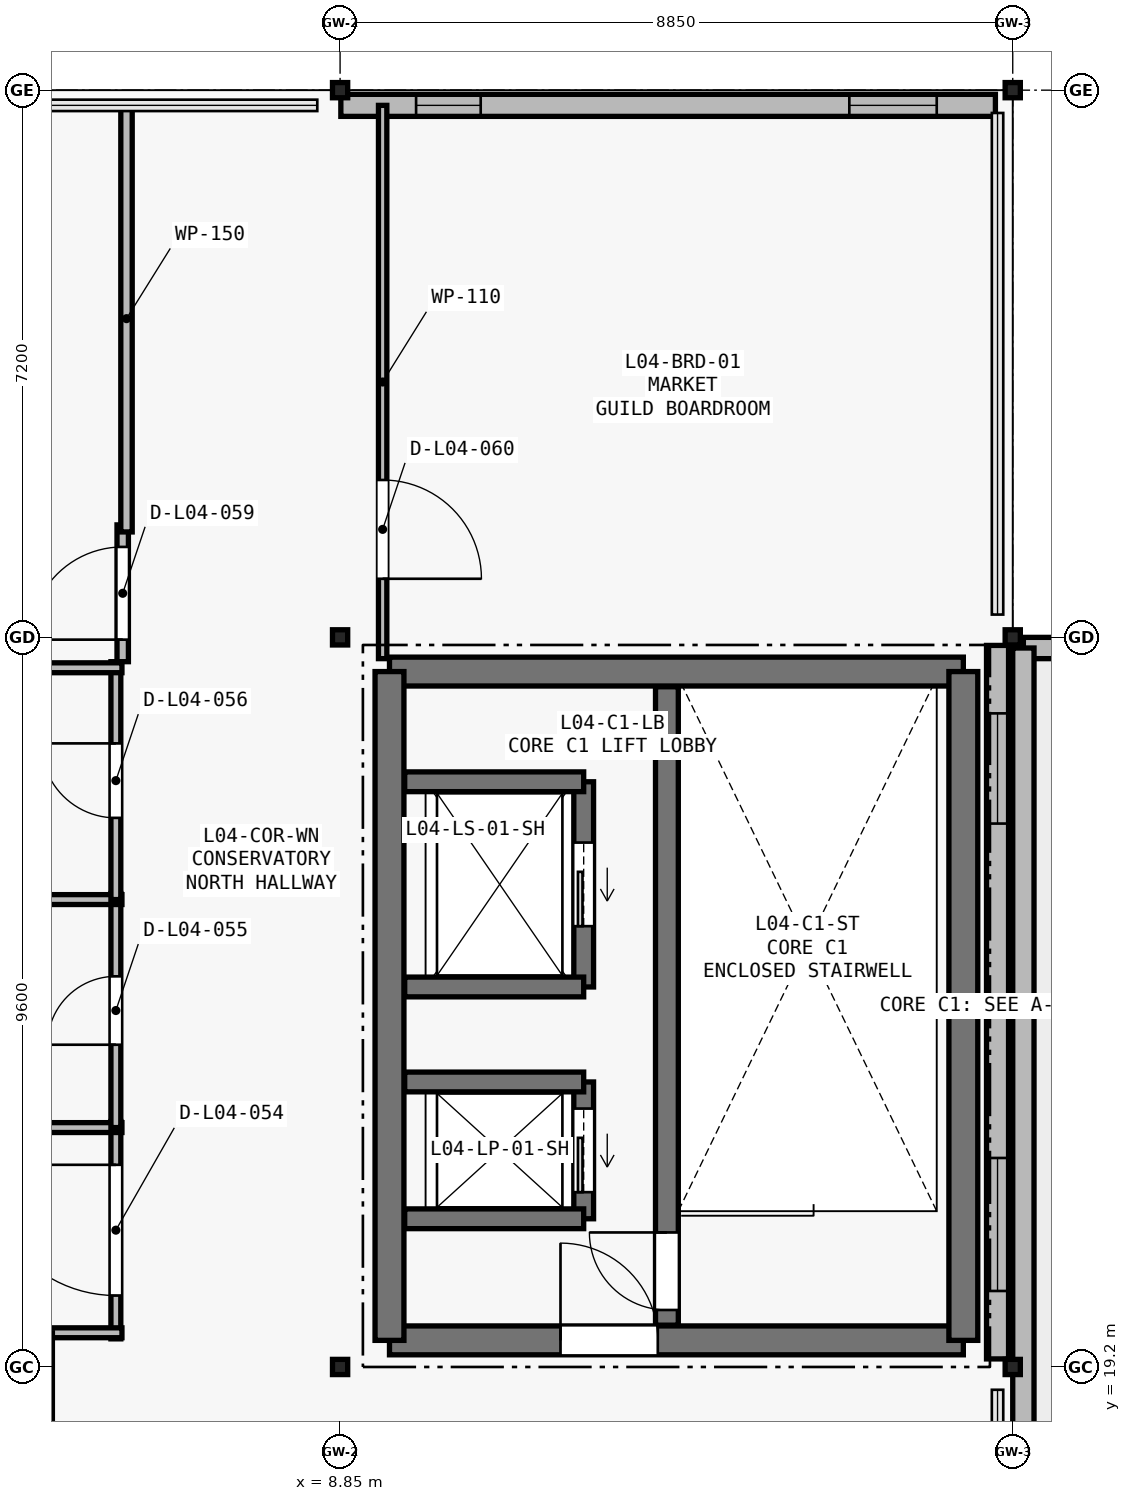
"""IFC4 building model, lengths in metres.
Left out: names, types, materials, properties, quantities, classifications, styles, units other than length and angle.
Written with IfcOpenShell. Run it as: python <this file> out.ifc"""

import sys

from ifc_helpers import new_model, si_unit, direction, frame, frame_2d, origin, origin_2d, place, context, subcontext, project, spatial, rectangle, i_section, extrude, element, fill, save


model = new_model("IFC4")
c1 = context("Model", 3, precision=1e-05, world=origin(), true_north=direction((0.0, 1.0)))
c2 = subcontext(c1, "Body", "Model", "MODEL_VIEW")
j1 = project(units=[si_unit("LENGTHUNIT", "METRE"), si_unit("PLANEANGLEUNIT", "RADIAN")], contexts=[c1])
p1 = place(None, origin())
s1 = spatial("IfcSite", under=j1, at=p1, CompositionType="ELEMENT")
p2 = place(p1, origin())
s2 = spatial("IfcBuilding", under=s1, at=p2, CompositionType="ELEMENT")
p3 = place(p2, frame((0.0, 0.0, 19.2)))
s3 = spatial("IfcBuildingStorey", under=s2, at=p3, CompositionType="ELEMENT", Elevation=19.2)
for number, where, z_axis, x_axis in (
    (1, (8.85, 19.2, 0.0), (0.0, 0.0, 1.0), (1.0, 0.0, 0.0)),
    (2, (8.85, 28.8, 0.0), (0.0, 0.0, 1.0), (1.0, 0.0, 0.0)),
    (3, (8.85, 36.0, 0.0), (0.0, 0.0, 1.0), (1.0, 0.0, 0.0)),
    (4, (17.7, 19.2, 0.0), (0.0, 0.0, 1.0), (1.0, 0.0, 0.0)),
    (5, (17.7, 28.8, 0.0), (0.0, 0.0, 1.0), (1.0, 0.0, 0.0)),
    (6, (17.7, 36.0, 0.0), (0.0, 0.0, 1.0), (1.0, 0.0, 0.0)),
):
    element("IfcColumn", number, at=place(p3, frame(where, z_axis=z_axis, x_axis=x_axis)), inside=s3, PredefinedType="COLUMN", context=c2, shape_type="SweptSolid", body=[
        extrude(i_section(OverallWidth=0.2, OverallDepth=0.2, WebThickness=0.008, FlangeThickness=0.012, FilletRadius=0.013, at=origin_2d()), origin(), (0.0, 0.0, 1.0), 4.2),
    ])
p4 = place(p3, frame((8.86, 35.8, 0.0), z_axis=(0.0, 0.0, 1.0), x_axis=(1.0, 0.0, 0.0)))
e7 = element("IfcWall", 7, at=p4, inside=s3, PredefinedType="SOLIDWALL", context=c2, shape_type="SweptSolid", body=[
    extrude(rectangle(XDim=8.612, YDim=0.29, at=frame_2d((4.306, 0.0))), origin(), (0.0, 0.0, 1.0), 3.35),
])
p5 = place(p4, frame((0.99, 0.0, 0.95)))
e8 = element("IfcOpeningElement", 8, at=p5, cuts=e7, PredefinedType="OPENING", context=c2, shape_type="SweptSolid", body=[
    extrude(rectangle(XDim=0.85, YDim=1.5, at=frame_2d((0.425, 0.75))), frame((0.0, 0.155, 0.0), z_axis=(0.0, -1.0, 0.0), x_axis=(1.0, 0.0, 0.0)), (0.0, 0.0, 1.0), 0.31),
])
p6 = place(p4, frame((6.69, 0.0, 0.95)))
e9 = element("IfcOpeningElement", 9, at=p6, cuts=e7, PredefinedType="OPENING", context=c2, shape_type="SweptSolid", body=[
    extrude(rectangle(XDim=1.15, YDim=1.5, at=frame_2d((0.575, 0.75))), frame((0.0, 0.155, 0.0), z_axis=(0.0, -1.0, 0.0), x_axis=(1.0, 0.0, 0.0)), (0.0, 0.0, 1.0), 0.31),
])
p7 = place(p3, frame((17.5, 28.694, 0.0), z_axis=(0.0, 0.0, 1.0), x_axis=(0.0, -1.0, 0.0)))
e10 = element("IfcWall", 10, at=p7, inside=s3, PredefinedType="SOLIDWALL", context=c2, shape_type="SweptSolid", body=[
    extrude(rectangle(XDim=9.388, YDim=0.29, at=frame_2d((4.694, 0.0))), origin(), (0.0, 0.0, 1.0), 3.35),
])
p8 = place(p7, frame((0.894, 0.0, 0.95)))
e11 = element("IfcOpeningElement", 11, at=p8, cuts=e10, PredefinedType="OPENING", context=c2, shape_type="SweptSolid", body=[
    extrude(rectangle(XDim=1.45, YDim=1.5, at=frame_2d((0.725, 0.75))), frame((0.0, 0.155, 0.0), z_axis=(0.0, -1.0, 0.0), x_axis=(1.0, 0.0, 0.0)), (0.0, 0.0, 1.0), 0.31),
])
p9 = place(p7, frame((6.744, 0.0, 0.95)))
e12 = element("IfcOpeningElement", 12, at=p9, cuts=e10, PredefinedType="OPENING", context=c2, shape_type="SweptSolid", body=[
    extrude(rectangle(XDim=1.75, YDim=1.5, at=frame_2d((0.875, 0.75))), frame((0.0, 0.155, 0.0), z_axis=(0.0, -1.0, 0.0), x_axis=(1.0, 0.0, 0.0)), (0.0, 0.0, 1.0), 0.31),
])
p10 = place(p3, frame((26.41, 28.66, 0.01), z_axis=(0.0, 0.0, 1.0), x_axis=(-1.0, 0.0, 0.0)))
e13 = element("IfcWall", 13, at=p10, inside=s3, PredefinedType="PARAPET", context=c2, shape_type="SweptSolid", body=[
    extrude(rectangle(XDim=8.57, YDim=0.28, at=frame_2d((4.285, 0.0))), origin(), (0.0, 0.0, 1.0), 1.15),
])
p11 = place(p3, frame((17.84, 28.66, 0.01), z_axis=(0.0, 0.0, 1.0), x_axis=(0.0, -1.0, 0.0)))
e14 = element("IfcWall", 14, at=p11, inside=s3, PredefinedType="PARAPET", context=c2, shape_type="SweptSolid", body=[
    extrude(rectangle(XDim=28.52, YDim=0.28, at=frame_2d((14.26, 0.0))), origin(), (0.0, 0.0, 1.0), 1.15),
])
p12 = place(p3, frame((9.5, 19.55, 0.0), z_axis=(0.0, 0.0, 1.0), x_axis=(1.0, 0.0, 0.0)))
e15 = element("IfcWall", 15, at=p12, inside=s3, PredefinedType="SHEAR", context=c2, shape_type="SweptSolid", body=[
    extrude(rectangle(XDim=7.55, YDim=0.38, at=frame_2d((3.775, 0.0))), origin(), (0.0, 0.0, 1.0), 4.2),
])
p13 = place(p12, frame((2.25, 0.0, 0.0)))
e16 = element("IfcOpeningElement", 16, at=p13, cuts=e15, PredefinedType="OPENING", context=c2, shape_type="SweptSolid", body=[
    extrude(rectangle(XDim=1.28, YDim=2.15, at=frame_2d((0.64, 1.075))), frame((0.0, 0.2, 0.0), z_axis=(0.0, -1.0, 0.0), x_axis=(1.0, 0.0, 0.0)), (0.0, 0.0, 1.0), 0.4),
])
p14 = place(p3, frame((17.05, 28.35, 0.0), z_axis=(0.0, 0.0, 1.0), x_axis=(-1.0, 0.0, 0.0)))
e17 = element("IfcWall", 17, at=p14, inside=s3, PredefinedType="SHEAR", context=c2, shape_type="SweptSolid", body=[
    extrude(rectangle(XDim=7.55, YDim=0.38, at=frame_2d((3.775, 0.0))), origin(), (0.0, 0.0, 1.0), 4.2),
])
for number, where, z_axis, x_axis in (
    (18, (9.5, 28.35, 0.0), (0.0, 0.0, 1.0), (0.0, -1.0, 0.0)),
    (19, (17.05, 19.55, 0.0), (0.0, 0.0, 1.0), (0.0, 1.0, 0.0)),
):
    element("IfcWall", number, at=place(p3, frame(where, z_axis=z_axis, x_axis=x_axis)), inside=s3, PredefinedType="SHEAR", context=c2, shape_type="SweptSolid", body=[
        extrude(rectangle(XDim=8.8, YDim=0.38, at=frame_2d((4.4, 0.0))), origin(), (0.0, 0.0, 1.0), 4.2),
    ])
p15 = place(p3, frame((13.15, 19.75, 0.0), z_axis=(0.0, 0.0, 1.0), x_axis=(0.0, 1.0, 0.0)))
e20 = element("IfcWall", 20, at=p15, inside=s3, PredefinedType="SHEAR", context=c2, shape_type="SweptSolid", body=[
    extrude(rectangle(XDim=8.4, YDim=0.3, at=frame_2d((4.2, 0.0))), origin(), (0.0, 0.0, 1.0), 4.2),
])
p16 = place(p15, frame((0.2, 0.0, 0.0)))
e21 = element("IfcOpeningElement", 21, at=p16, cuts=e20, PredefinedType="OPENING", context=c2, shape_type="SweptSolid", body=[
    extrude(rectangle(XDim=1.02, YDim=2.1, at=frame_2d((0.51, 1.05))), frame((0.0, 0.16, 0.0), z_axis=(0.0, -1.0, 0.0), x_axis=(1.0, 0.0, 0.0)), (0.0, 0.0, 1.0), 0.32),
])
p17 = place(p3, frame((12.055, 21.15, 0.0), z_axis=(0.0, 0.0, 1.0), x_axis=(0.0, 1.0, 0.0)))
e22 = element("IfcWall", 22, at=p17, inside=s3, PredefinedType="SHEAR", context=c2, shape_type="SweptSolid", body=[
    extrude(rectangle(XDim=1.8, YDim=0.26, at=frame_2d((0.9, 0.0))), origin(), (0.0, 0.0, 1.0), 4.2),
])
p18 = place(p17, frame((0.35, 0.0, 0.0)))
e23 = element("IfcOpeningElement", 23, at=p18, cuts=e22, PredefinedType="OPENING", context=c2, shape_type="SweptSolid", body=[
    extrude(rectangle(XDim=1.1, YDim=2.15, at=frame_2d((0.55, 1.075))), frame((0.0, 0.14, 0.0), z_axis=(0.0, -1.0, 0.0), x_axis=(1.0, 0.0, 0.0)), (0.0, 0.0, 1.0), 0.28),
])
for number, where, z_axis, x_axis in (
    (24, (9.7, 21.15, 0.0), (0.0, 0.0, 1.0), (1.0, 0.0, 0.0)),
    (25, (9.7, 22.95, 0.0), (0.0, 0.0, 1.0), (1.0, 0.0, 0.0)),
):
    element("IfcWall", number, at=place(p3, frame(where, z_axis=z_axis, x_axis=x_axis)), inside=s3, PredefinedType="SHEAR", context=c2, shape_type="SweptSolid", body=[
        extrude(rectangle(XDim=2.355, YDim=0.26, at=frame_2d((1.177, 0.0))), origin(), (0.0, 0.0, 1.0), 4.2),
    ])
p19 = place(p3, frame((12.055, 24.2, 0.0), z_axis=(0.0, 0.0, 1.0), x_axis=(0.0, 1.0, 0.0)))
e26 = element("IfcWall", 26, at=p19, inside=s3, PredefinedType="SHEAR", context=c2, shape_type="SweptSolid", body=[
    extrude(rectangle(XDim=2.7, YDim=0.26, at=frame_2d((1.35, 0.0))), origin(), (0.0, 0.0, 1.0), 4.2),
])
p20 = place(p19, frame((0.8, 0.0, 0.0)))
e27 = element("IfcOpeningElement", 27, at=p20, cuts=e26, PredefinedType="OPENING", context=c2, shape_type="SweptSolid", body=[
    extrude(rectangle(XDim=1.1, YDim=2.15, at=frame_2d((0.55, 1.075))), frame((0.0, 0.14, 0.0), z_axis=(0.0, -1.0, 0.0), x_axis=(1.0, 0.0, 0.0)), (0.0, 0.0, 1.0), 0.28),
])
for number, where, z_axis, x_axis in (
    (28, (9.7, 24.2, 0.0), (0.0, 0.0, 1.0), (1.0, 0.0, 0.0)),
    (29, (9.7, 26.9, 0.0), (0.0, 0.0, 1.0), (1.0, 0.0, 0.0)),
):
    element("IfcWall", number, at=place(p3, frame(where, z_axis=z_axis, x_axis=x_axis)), inside=s3, PredefinedType="SHEAR", context=c2, shape_type="SweptSolid", body=[
        extrude(rectangle(XDim=2.355, YDim=0.26, at=frame_2d((1.177, 0.0))), origin(), (0.0, 0.0, 1.0), 4.2),
    ])
p21 = place(p3, frame((5.9, 19.57, 0.0), z_axis=(0.0, 0.0, 1.0), x_axis=(0.0, 1.0, 0.0)))
e30 = element("IfcWall", 30, at=p21, inside=s3, PredefinedType="PARTITIONING", context=c2, shape_type="SweptSolid", body=[
    extrude(rectangle(XDim=2.86, YDim=0.13, at=frame_2d((1.43, 0.0))), origin(), (0.0, 0.0, 1.0), 3.55),
])
p22 = place(p21, frame((0.57, 0.0, 0.0)))
e31 = element("IfcOpeningElement", 31, at=p22, cuts=e30, PredefinedType="OPENING", context=c2, shape_type="SweptSolid", body=[
    extrude(rectangle(XDim=1.72, YDim=2.32, at=frame_2d((0.86, 1.16))), frame((0.0, 0.075, 0.0), z_axis=(0.0, -1.0, 0.0), x_axis=(1.0, 0.0, 0.0)), (0.0, 0.0, 1.0), 0.15),
])
for number, where, z_axis, x_axis in (
    (32, (0.2, 19.65, 0.0), (0.0, 0.0, 1.0), (1.0, 0.0, 0.0)),
    (33, (5.98, 22.35, 0.0), (0.0, 0.0, 1.0), (-1.0, 0.0, 0.0)),
):
    element("IfcWall", number, at=place(p3, frame(where, z_axis=z_axis, x_axis=x_axis)), inside=s3, PredefinedType="PARTITIONING", context=c2, shape_type="SweptSolid", body=[
        extrude(rectangle(XDim=5.78, YDim=0.13, at=frame_2d((2.89, 0.0))), origin(), (0.0, 0.0, 1.0), 3.72),
    ])
p23 = place(p3, frame((5.9, 22.35, 0.0), z_axis=(0.0, 0.0, 1.0), x_axis=(0.0, 1.0, 0.0)))
e34 = element("IfcWall", 34, at=p23, inside=s3, PredefinedType="PARTITIONING", context=c2, shape_type="SweptSolid", body=[
    extrude(rectangle(XDim=3.08, YDim=0.13, at=frame_2d((1.54, 0.0))), origin(), (0.0, 0.0, 1.0), 3.55),
])
p24 = place(p23, frame((1.09, 0.0, 0.0)))
e35 = element("IfcOpeningElement", 35, at=p24, cuts=e34, PredefinedType="OPENING", context=c2, shape_type="SweptSolid", body=[
    extrude(rectangle(XDim=0.9, YDim=2.36, at=frame_2d((0.45, 1.18))), frame((0.0, 0.075, 0.0), z_axis=(0.0, -1.0, 0.0), x_axis=(1.0, 0.0, 0.0)), (0.0, 0.0, 1.0), 0.15),
])
p25 = place(p3, frame((5.98, 25.35, 0.0), z_axis=(0.0, 0.0, 1.0), x_axis=(-1.0, 0.0, 0.0)))
e36 = element("IfcWall", 36, at=p25, inside=s3, PredefinedType="PARTITIONING", context=c2, shape_type="SweptSolid", body=[
    extrude(rectangle(XDim=5.78, YDim=0.13, at=frame_2d((2.89, 0.0))), origin(), (0.0, 0.0, 1.0), 3.72),
])
p26 = place(p3, frame((5.9, 25.35, 0.0), z_axis=(0.0, 0.0, 1.0), x_axis=(0.0, 1.0, 0.0)))
e37 = element("IfcWall", 37, at=p26, inside=s3, PredefinedType="PARTITIONING", context=c2, shape_type="SweptSolid", body=[
    extrude(rectangle(XDim=3.13, YDim=0.13, at=frame_2d((1.565, 0.0))), origin(), (0.0, 0.0, 1.0), 3.55),
])
p27 = place(p26, frame((1.075, 0.0, 0.0)))
e38 = element("IfcOpeningElement", 38, at=p27, cuts=e37, PredefinedType="OPENING", context=c2, shape_type="SweptSolid", body=[
    extrude(rectangle(XDim=0.98, YDim=2.36, at=frame_2d((0.49, 1.18))), frame((0.0, 0.075, 0.0), z_axis=(0.0, -1.0, 0.0), x_axis=(1.0, 0.0, 0.0)), (0.0, 0.0, 1.0), 0.15),
])
p28 = place(p3, frame((5.98, 28.4, 0.0), z_axis=(0.0, 0.0, 1.0), x_axis=(-1.0, 0.0, 0.0)))
e39 = element("IfcWall", 39, at=p28, inside=s3, PredefinedType="PARTITIONING", context=c2, shape_type="SweptSolid", body=[
    extrude(rectangle(XDim=5.78, YDim=0.13, at=frame_2d((2.89, 0.0))), origin(), (0.0, 0.0, 1.0), 3.72),
])
p29 = place(p3, frame((4.98, 9.52, 0.0), z_axis=(0.0, 0.0, 1.0), x_axis=(0.0, 1.0, 0.0)))
e40 = element("IfcWall", 40, at=p29, inside=s3, PredefinedType="PARTITIONING", context=c2, shape_type="SweptSolid", body=[
    extrude(rectangle(XDim=10.13, YDim=0.17, at=frame_2d((5.065, 0.0))), origin(), (0.0, 0.0, 1.0), 3.72),
])
p30 = place(p29, frame((4.165, 0.0, 0.0)))
e41 = element("IfcOpeningElement", 41, at=p30, cuts=e40, PredefinedType="OPENING", context=c2, shape_type="SweptSolid", body=[
    extrude(rectangle(XDim=1.8, YDim=2.42, at=frame_2d((0.9, 1.21))), frame((0.0, 0.095, 0.0), z_axis=(0.0, -1.0, 0.0), x_axis=(1.0, 0.0, 0.0)), (0.0, 0.0, 1.0), 0.19),
])
p31 = place(p3, frame((5.99, 28.48, 0.0), z_axis=(0.0, 0.0, 1.0), x_axis=(0.0, 1.0, 0.0)))
e42 = element("IfcWall", 42, at=p31, inside=s3, PredefinedType="PARTITIONING", context=c2, shape_type="SweptSolid", body=[
    extrude(rectangle(XDim=1.8, YDim=0.15, at=frame_2d((0.9, 0.0))), origin(), (0.0, 0.0, 1.0), 3.65),
])
p32 = place(p31, frame((0.29, 0.0, 0.0)))
e43 = element("IfcOpeningElement", 43, at=p32, cuts=e42, PredefinedType="OPENING", context=c2, shape_type="SweptSolid", body=[
    extrude(rectangle(XDim=1.22, YDim=2.36, at=frame_2d((0.61, 1.18))), frame((0.0, 0.085, 0.0), z_axis=(0.0, -1.0, 0.0), x_axis=(1.0, 0.0, 0.0)), (0.0, 0.0, 1.0), 0.17),
])
p33 = place(p3, frame((6.04, 30.187, 0.0), z_axis=(0.0, 0.0, 1.0), x_axis=(0.0, 1.0, 0.0)))
e44 = element("IfcWall", 44, at=p33, inside=s3, PredefinedType="PARTITIONING", context=c2, shape_type="SweptSolid", body=[
    extrude(rectangle(XDim=5.613, YDim=0.15, at=frame_2d((2.807, 0.0))), origin(), (0.0, 0.0, 1.0), 3.65),
])
p34 = place(p3, frame((9.41, 35.8, 0.0), z_axis=(0.0, 0.0, 1.0), x_axis=(0.0, -1.0, 0.0)))
e45 = element("IfcWall", 45, at=p34, inside=s3, PredefinedType="PARTITIONING", context=c2, shape_type="SweptSolid", body=[
    extrude(rectangle(XDim=7.28, YDim=0.11, at=frame_2d((3.64, 0.0))), origin(), (0.0, 0.0, 1.0), 3.72),
])
p35 = place(p34, frame((4.929, 0.0, 0.0)))
e46 = element("IfcOpeningElement", 46, at=p35, cuts=e45, PredefinedType="OPENING", context=c2, shape_type="SweptSolid", body=[
    extrude(rectangle(XDim=1.3, YDim=2.36, at=frame_2d((0.65, 1.18))), frame((0.0, 0.065, 0.0), z_axis=(0.0, -1.0, 0.0), x_axis=(1.0, 0.0, 0.0)), (0.0, 0.0, 1.0), 0.13),
])
p36 = place(p5, origin())
e47 = element("IfcWindow", 47, at=p36, inside=s3, PartitioningType="SINGLE_PANEL", PredefinedType="WINDOW", context=c2, shape_type="SweptSolid", body=[
    extrude(rectangle(XDim=0.85, YDim=1.5, at=frame_2d((0.425, 0.75))), frame((0.0, 0.03, 0.0), z_axis=(0.0, -1.0, 0.0), x_axis=(1.0, 0.0, 0.0)), (0.0, 0.0, 1.0), 0.06),
])
fill(e8, e47)
p37 = place(p6, origin())
e48 = element("IfcWindow", 48, at=p37, inside=s3, PartitioningType="SINGLE_PANEL", PredefinedType="WINDOW", context=c2, shape_type="SweptSolid", body=[
    extrude(rectangle(XDim=1.15, YDim=1.5, at=frame_2d((0.575, 0.75))), frame((0.0, 0.03, 0.0), z_axis=(0.0, -1.0, 0.0), x_axis=(1.0, 0.0, 0.0)), (0.0, 0.0, 1.0), 0.06),
])
fill(e9, e48)
p38 = place(p8, origin())
e49 = element("IfcWindow", 49, at=p38, inside=s3, PartitioningType="SINGLE_PANEL", PredefinedType="WINDOW", context=c2, shape_type="SweptSolid", body=[
    extrude(rectangle(XDim=1.45, YDim=1.5, at=frame_2d((0.725, 0.75))), frame((0.0, 0.03, 0.0), z_axis=(0.0, -1.0, 0.0), x_axis=(1.0, 0.0, 0.0)), (0.0, 0.0, 1.0), 0.06),
])
fill(e11, e49)
p39 = place(p9, origin())
e50 = element("IfcWindow", 50, at=p39, inside=s3, PartitioningType="SINGLE_PANEL", PredefinedType="WINDOW", context=c2, shape_type="SweptSolid", body=[
    extrude(rectangle(XDim=1.75, YDim=1.5, at=frame_2d((0.875, 0.75))), frame((0.0, 0.03, 0.0), z_axis=(0.0, -1.0, 0.0), x_axis=(1.0, 0.0, 0.0)), (0.0, 0.0, 1.0), 0.06),
])
fill(e12, e50)
p40 = place(p13, origin())
e51 = element("IfcDoor", 51, at=p40, inside=s3, OperationType="SINGLE_SWING_LEFT", PredefinedType="DOOR", context=c2, shape_type="SweptSolid", body=[
    extrude(rectangle(XDim=1.28, YDim=2.15, at=frame_2d((0.64, 1.075))), frame((0.0, 0.025, 0.0), z_axis=(0.0, -1.0, 0.0), x_axis=(1.0, 0.0, 0.0)), (0.0, 0.0, 1.0), 0.05),
])
fill(e16, e51)
p41 = place(p16, origin())
e52 = element("IfcDoor", 52, at=p41, inside=s3, OperationType="SINGLE_SWING_RIGHT", PredefinedType="DOOR", context=c2, shape_type="SweptSolid", body=[
    extrude(rectangle(XDim=1.02, YDim=2.1, at=frame_2d((0.51, 1.05))), frame((0.0, 0.025, 0.0), z_axis=(0.0, -1.0, 0.0), x_axis=(1.0, 0.0, 0.0)), (0.0, 0.0, 1.0), 0.05),
])
fill(e21, e52)
p42 = place(p18, origin())
e53 = element("IfcDoor", 53, at=p42, inside=s3, OperationType="SLIDING_TO_LEFT", PredefinedType="DOOR", context=c2, shape_type="SweptSolid", body=[
    extrude(rectangle(XDim=1.1, YDim=2.15, at=frame_2d((0.55, 1.075))), frame((0.0, 0.025, 0.0), z_axis=(0.0, -1.0, 0.0), x_axis=(1.0, 0.0, 0.0)), (0.0, 0.0, 1.0), 0.05),
])
fill(e23, e53)
p43 = place(p20, origin())
e54 = element("IfcDoor", 54, at=p43, inside=s3, OperationType="SLIDING_TO_LEFT", PredefinedType="DOOR", context=c2, shape_type="SweptSolid", body=[
    extrude(rectangle(XDim=1.1, YDim=2.15, at=frame_2d((0.55, 1.075))), frame((0.0, 0.025, 0.0), z_axis=(0.0, -1.0, 0.0), x_axis=(1.0, 0.0, 0.0)), (0.0, 0.0, 1.0), 0.05),
])
fill(e27, e54)
p44 = place(p22, origin())
e55 = element("IfcDoor", 55, at=p44, inside=s3, OperationType="SINGLE_SWING_RIGHT", PredefinedType="DOOR", context=c2, shape_type="SweptSolid", body=[
    extrude(rectangle(XDim=1.72, YDim=2.32, at=frame_2d((0.86, 1.16))), frame((0.0, 0.025, 0.0), z_axis=(0.0, -1.0, 0.0), x_axis=(1.0, 0.0, 0.0)), (0.0, 0.0, 1.0), 0.05),
])
fill(e31, e55)
p45 = place(p24, origin())
e56 = element("IfcDoor", 56, at=p45, inside=s3, OperationType="SINGLE_SWING_LEFT", PredefinedType="DOOR", context=c2, shape_type="SweptSolid", body=[
    extrude(rectangle(XDim=0.9, YDim=2.36, at=frame_2d((0.45, 1.18))), frame((0.0, 0.025, 0.0), z_axis=(0.0, -1.0, 0.0), x_axis=(1.0, 0.0, 0.0)), (0.0, 0.0, 1.0), 0.05),
])
fill(e35, e56)
p46 = place(p27, origin())
e57 = element("IfcDoor", 57, at=p46, inside=s3, OperationType="SINGLE_SWING_RIGHT", PredefinedType="DOOR", context=c2, shape_type="SweptSolid", body=[
    extrude(rectangle(XDim=0.98, YDim=2.36, at=frame_2d((0.49, 1.18))), frame((0.0, 0.025, 0.0), z_axis=(0.0, -1.0, 0.0), x_axis=(1.0, 0.0, 0.0)), (0.0, 0.0, 1.0), 0.05),
])
fill(e38, e57)
p47 = place(p32, origin())
e58 = element("IfcDoor", 58, at=p47, inside=s3, OperationType="SINGLE_SWING_LEFT", PredefinedType="DOOR", context=c2, shape_type="SweptSolid", body=[
    extrude(rectangle(XDim=1.22, YDim=2.36, at=frame_2d((0.61, 1.18))), frame((0.0, 0.025, 0.0), z_axis=(0.0, -1.0, 0.0), x_axis=(1.0, 0.0, 0.0)), (0.0, 0.0, 1.0), 0.05),
])
fill(e43, e58)
p48 = place(p35, origin())
e59 = element("IfcDoor", 59, at=p48, inside=s3, OperationType="SINGLE_SWING_RIGHT", PredefinedType="DOOR", context=c2, shape_type="SweptSolid", body=[
    extrude(rectangle(XDim=1.3, YDim=2.36, at=frame_2d((0.65, 1.18))), frame((0.0, 0.025, 0.0), z_axis=(0.0, -1.0, 0.0), x_axis=(1.0, 0.0, 0.0)), (0.0, 0.0, 1.0), 0.05),
])
fill(e46, e59)
save(model, sys.argv[1])
